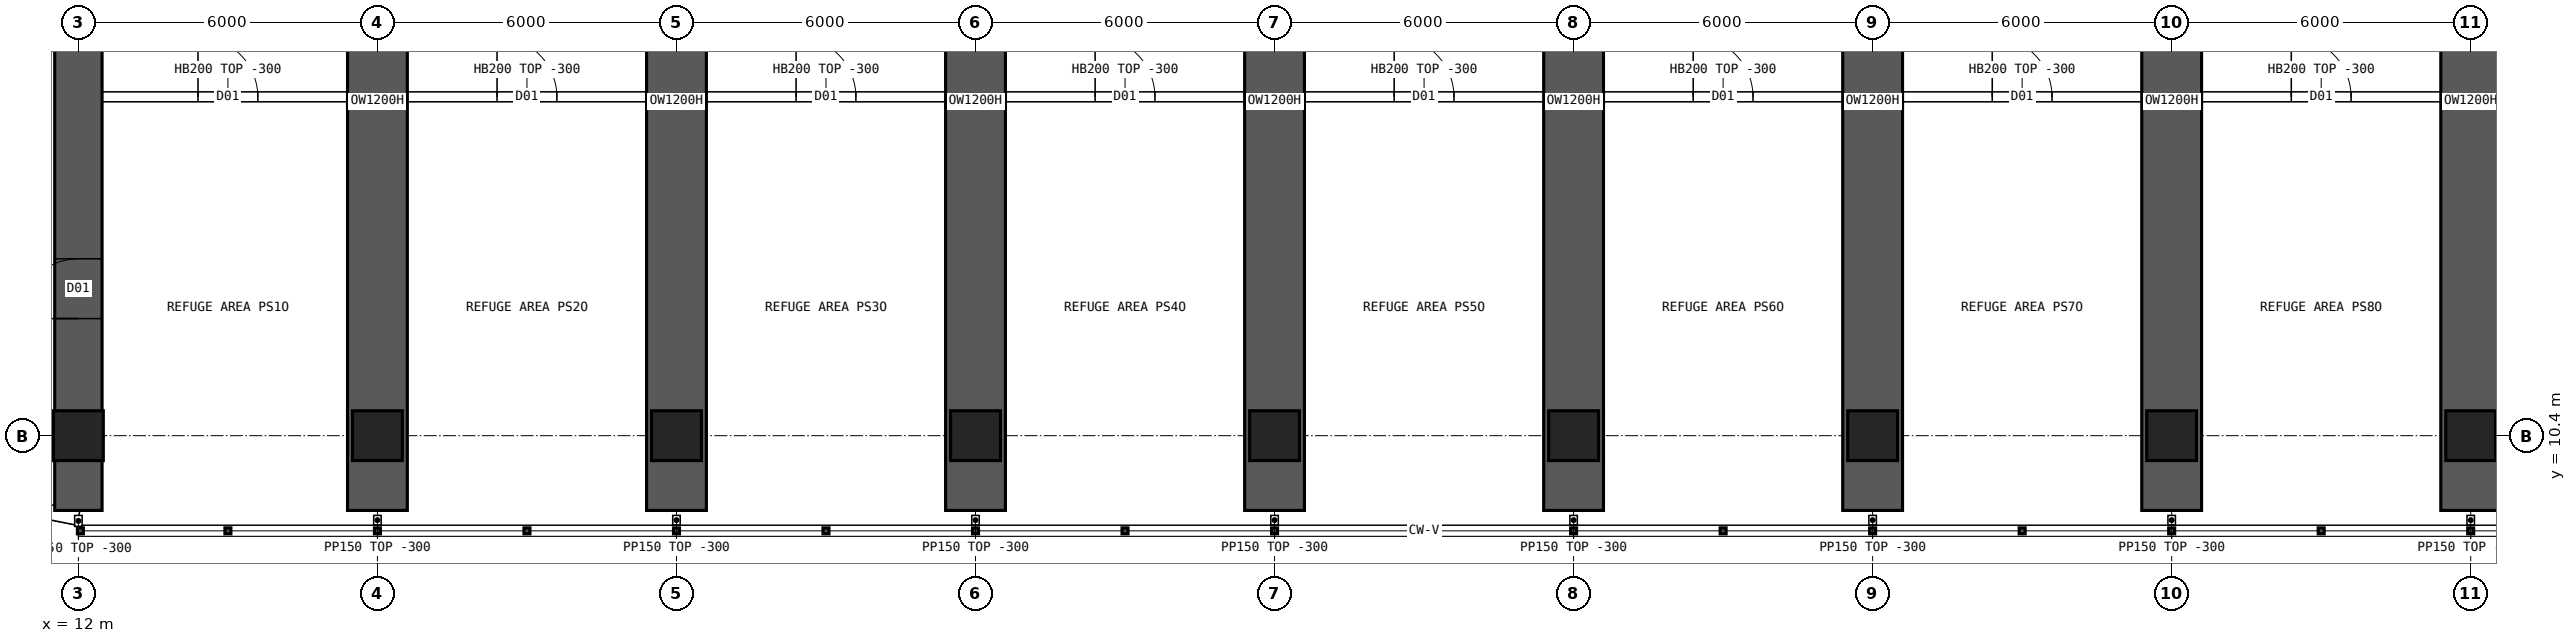
"""IFC4 building model, lengths in metres.
Left out: names, types, materials, properties, quantities, classifications, styles, units other than length and angle.
Written with IfcOpenShell. Run it as: python <this file> out.ifc"""

import sys

from ifc_helpers import new_model, si_unit, direction, frame, frame_2d, origin, origin_2d, place, context, subcontext, project, spatial, polyline, rectangle, hollow_rectangle, outline, extrude, element, fill, save


model = new_model("IFC4")
c1 = context("Model", 3, precision=1e-05, world=origin(), true_north=direction((0.0, 1.0)))
c2 = subcontext(c1, "Body", "Model", "MODEL_VIEW")
j1 = project(units=[si_unit("LENGTHUNIT", "METRE"), si_unit("PLANEANGLEUNIT", "RADIAN")], contexts=[c1])
p1 = place(None, origin())
s1 = spatial("IfcSite", under=j1, at=p1, CompositionType="ELEMENT")
p2 = place(p1, origin())
s2 = spatial("IfcBuilding", under=s1, at=p2, CompositionType="ELEMENT")
p3 = place(p2, frame((0.0, 0.0, 133.15)))
s3 = spatial("IfcBuildingStorey", under=s2, at=p3, CompositionType="ELEMENT", Elevation=133.15)
for number, where, z_axis, x_axis in (
    (1, (12.0, 10.4, 0.0), (0.0, 0.0, 1.0), (1.0, 0.0, 0.0)),
    (2, (18.0, 10.4, 0.0), (0.0, 0.0, 1.0), (1.0, 0.0, 0.0)),
    (3, (24.0, 10.4, 0.0), (0.0, 0.0, 1.0), (1.0, 0.0, 0.0)),
    (4, (30.0, 10.4, 0.0), (0.0, 0.0, 1.0), (1.0, 0.0, 0.0)),
    (5, (36.0, 10.4, 0.0), (0.0, 0.0, 1.0), (1.0, 0.0, 0.0)),
    (6, (42.0, 10.4, 0.0), (0.0, 0.0, 1.0), (1.0, 0.0, 0.0)),
    (7, (48.0, 10.4, 0.0), (0.0, 0.0, 1.0), (1.0, 0.0, 0.0)),
    (8, (54.0, 10.4, 0.0), (0.0, 0.0, 1.0), (1.0, 0.0, 0.0)),
    (9, (60.0, 10.4, 0.0), (0.0, 0.0, 1.0), (1.0, 0.0, 0.0)),
):
    element("IfcColumn", number, at=place(p3, frame(where, z_axis=z_axis, x_axis=x_axis)), inside=s3, PredefinedType="COLUMN", context=c2, shape_type="SweptSolid", body=[
        extrude(hollow_rectangle(XDim=1.0, YDim=1.0, WallThickness=0.1, at=origin_2d()), origin(), (0.0, 0.0, 1.0), 7.2),
    ])
p4 = place(p3, frame((12.0, 8.9, 0.0), z_axis=(0.0, 0.0, 1.0), x_axis=(0.0, 1.0, 0.0)))
e10 = element("IfcWall", 10, at=p4, inside=s3, PredefinedType="SHEAR", context=c2, shape_type="SweptSolid", body=[
    extrude(rectangle(XDim=46.2, YDim=0.95, at=frame_2d((23.1, 0.0))), origin(), (0.0, 0.0, 1.0), 7.2),
])
p5 = place(p4, frame((3.85, 0.0, 0.0)))
e11 = element("IfcOpeningElement", 11, at=p5, cuts=e10, PredefinedType="OPENING", context=c2, shape_type="SweptSolid", body=[
    extrude(rectangle(XDim=1.2, YDim=2.1, at=frame_2d((0.6, 1.05))), frame((0.0, 0.485, 0.0), z_axis=(0.0, -1.0, 0.0), x_axis=(1.0, 0.0, 0.0)), (0.0, 0.0, 1.0), 0.97),
])
p6 = place(p4, frame((10.762, 0.0, 0.0)))
e12 = element("IfcOpeningElement", 12, at=p6, cuts=e10, PredefinedType="OPENING", context=c2, shape_type="SweptSolid", body=[
    extrude(rectangle(XDim=1.2, YDim=2.1, at=frame_2d((0.6, 1.05))), frame((0.0, 0.485, 0.0), z_axis=(0.0, -1.0, 0.0), x_axis=(1.0, 0.0, 0.0)), (0.0, 0.0, 1.0), 0.97),
])
p7 = place(p4, frame((41.15, 0.0, 0.0)))
e13 = element("IfcOpeningElement", 13, at=p7, cuts=e10, PredefinedType="OPENING", context=c2, shape_type="SweptSolid", body=[
    extrude(rectangle(XDim=1.2, YDim=2.1, at=frame_2d((0.6, 1.05))), frame((0.0, 0.485, 0.0), z_axis=(0.0, -1.0, 0.0), x_axis=(1.0, 0.0, 0.0)), (0.0, 0.0, 1.0), 0.97),
])
p8 = place(p4, frame((34.238, 0.0, 0.0)))
e14 = element("IfcOpeningElement", 14, at=p8, cuts=e10, PredefinedType="OPENING", context=c2, shape_type="SweptSolid", body=[
    extrude(rectangle(XDim=1.2, YDim=2.1, at=frame_2d((0.6, 1.05))), frame((0.0, 0.485, 0.0), z_axis=(0.0, -1.0, 0.0), x_axis=(1.0, 0.0, 0.0)), (0.0, 0.0, 1.0), 0.97),
])
p9 = place(p3, frame((18.0, 8.9, 0.0), z_axis=(0.0, 0.0, 1.0), x_axis=(0.0, 1.0, 0.0)))
e15 = element("IfcWall", 15, at=p9, inside=s3, PredefinedType="SHEAR", context=c2, shape_type="SweptSolid", body=[
    extrude(rectangle(XDim=16.425, YDim=1.2, at=frame_2d((8.212, 0.0))), origin(), (0.0, 0.0, 1.0), 7.2),
])
p10 = place(p9, frame((14.825, 0.0, 0.0)))
e16 = element("IfcOpeningElement", 16, at=p10, cuts=e15, PredefinedType="OPENING", context=c2, shape_type="SweptSolid", body=[
    extrude(rectangle(XDim=1.2, YDim=2.1, at=frame_2d((0.6, 1.05))), frame((0.0, 0.61, 0.0), z_axis=(0.0, -1.0, 0.0), x_axis=(1.0, 0.0, 0.0)), (0.0, 0.0, 1.0), 1.22),
])
p11 = place(p3, frame((24.0, 8.9, 0.0), z_axis=(0.0, 0.0, 1.0), x_axis=(0.0, 1.0, 0.0)))
e17 = element("IfcWall", 17, at=p11, inside=s3, PredefinedType="SHEAR", context=c2, shape_type="SweptSolid", body=[
    extrude(rectangle(XDim=16.425, YDim=1.2, at=frame_2d((8.212, 0.0))), origin(), (0.0, 0.0, 1.0), 7.2),
])
p12 = place(p11, frame((14.825, 0.0, 0.0)))
e18 = element("IfcOpeningElement", 18, at=p12, cuts=e17, PredefinedType="OPENING", context=c2, shape_type="SweptSolid", body=[
    extrude(rectangle(XDim=1.2, YDim=2.1, at=frame_2d((0.6, 1.05))), frame((0.0, 0.61, 0.0), z_axis=(0.0, -1.0, 0.0), x_axis=(1.0, 0.0, 0.0)), (0.0, 0.0, 1.0), 1.22),
])
p13 = place(p3, frame((30.0, 8.9, 0.0), z_axis=(0.0, 0.0, 1.0), x_axis=(0.0, 1.0, 0.0)))
e19 = element("IfcWall", 19, at=p13, inside=s3, PredefinedType="SHEAR", context=c2, shape_type="SweptSolid", body=[
    extrude(rectangle(XDim=16.425, YDim=1.2, at=frame_2d((8.212, 0.0))), origin(), (0.0, 0.0, 1.0), 7.2),
])
p14 = place(p13, frame((14.825, 0.0, 0.0)))
e20 = element("IfcOpeningElement", 20, at=p14, cuts=e19, PredefinedType="OPENING", context=c2, shape_type="SweptSolid", body=[
    extrude(rectangle(XDim=1.2, YDim=2.1, at=frame_2d((0.6, 1.05))), frame((0.0, 0.61, 0.0), z_axis=(0.0, -1.0, 0.0), x_axis=(1.0, 0.0, 0.0)), (0.0, 0.0, 1.0), 1.22),
])
p15 = place(p3, frame((36.0, 8.9, 0.0), z_axis=(0.0, 0.0, 1.0), x_axis=(0.0, 1.0, 0.0)))
e21 = element("IfcWall", 21, at=p15, inside=s3, PredefinedType="SHEAR", context=c2, shape_type="SweptSolid", body=[
    extrude(rectangle(XDim=16.425, YDim=1.2, at=frame_2d((8.212, 0.0))), origin(), (0.0, 0.0, 1.0), 7.2),
])
p16 = place(p15, frame((14.825, 0.0, 0.0)))
e22 = element("IfcOpeningElement", 22, at=p16, cuts=e21, PredefinedType="OPENING", context=c2, shape_type="SweptSolid", body=[
    extrude(rectangle(XDim=1.2, YDim=2.1, at=frame_2d((0.6, 1.05))), frame((0.0, 0.61, 0.0), z_axis=(0.0, -1.0, 0.0), x_axis=(1.0, 0.0, 0.0)), (0.0, 0.0, 1.0), 1.22),
])
p17 = place(p3, frame((42.0, 8.9, 0.0), z_axis=(0.0, 0.0, 1.0), x_axis=(0.0, 1.0, 0.0)))
e23 = element("IfcWall", 23, at=p17, inside=s3, PredefinedType="SHEAR", context=c2, shape_type="SweptSolid", body=[
    extrude(rectangle(XDim=16.425, YDim=1.2, at=frame_2d((8.212, 0.0))), origin(), (0.0, 0.0, 1.0), 7.2),
])
p18 = place(p17, frame((14.825, 0.0, 0.0)))
e24 = element("IfcOpeningElement", 24, at=p18, cuts=e23, PredefinedType="OPENING", context=c2, shape_type="SweptSolid", body=[
    extrude(rectangle(XDim=1.2, YDim=2.1, at=frame_2d((0.6, 1.05))), frame((0.0, 0.61, 0.0), z_axis=(0.0, -1.0, 0.0), x_axis=(1.0, 0.0, 0.0)), (0.0, 0.0, 1.0), 1.22),
])
p19 = place(p3, frame((48.0, 8.9, 0.0), z_axis=(0.0, 0.0, 1.0), x_axis=(0.0, 1.0, 0.0)))
e25 = element("IfcWall", 25, at=p19, inside=s3, PredefinedType="SHEAR", context=c2, shape_type="SweptSolid", body=[
    extrude(rectangle(XDim=16.425, YDim=1.2, at=frame_2d((8.212, 0.0))), origin(), (0.0, 0.0, 1.0), 7.2),
])
p20 = place(p19, frame((14.825, 0.0, 0.0)))
e26 = element("IfcOpeningElement", 26, at=p20, cuts=e25, PredefinedType="OPENING", context=c2, shape_type="SweptSolid", body=[
    extrude(rectangle(XDim=1.2, YDim=2.1, at=frame_2d((0.6, 1.05))), frame((0.0, 0.61, 0.0), z_axis=(0.0, -1.0, 0.0), x_axis=(1.0, 0.0, 0.0)), (0.0, 0.0, 1.0), 1.22),
])
p21 = place(p3, frame((54.0, 8.9, 0.0), z_axis=(0.0, 0.0, 1.0), x_axis=(0.0, 1.0, 0.0)))
e27 = element("IfcWall", 27, at=p21, inside=s3, PredefinedType="SHEAR", context=c2, shape_type="SweptSolid", body=[
    extrude(rectangle(XDim=16.425, YDim=1.2, at=frame_2d((8.212, 0.0))), origin(), (0.0, 0.0, 1.0), 7.2),
])
p22 = place(p21, frame((14.825, 0.0, 0.0)))
e28 = element("IfcOpeningElement", 28, at=p22, cuts=e27, PredefinedType="OPENING", context=c2, shape_type="SweptSolid", body=[
    extrude(rectangle(XDim=1.2, YDim=2.1, at=frame_2d((0.6, 1.05))), frame((0.0, 0.61, 0.0), z_axis=(0.0, -1.0, 0.0), x_axis=(1.0, 0.0, 0.0)), (0.0, 0.0, 1.0), 1.22),
])
p23 = place(p3, frame((60.0, 8.9, 0.0), z_axis=(0.0, 0.0, 1.0), x_axis=(0.0, 1.0, 0.0)))
e29 = element("IfcWall", 29, at=p23, inside=s3, PredefinedType="SHEAR", context=c2, shape_type="SweptSolid", body=[
    extrude(rectangle(XDim=16.425, YDim=1.2, at=frame_2d((8.212, 0.0))), origin(), (0.0, 0.0, 1.0), 7.2),
])
p24 = place(p23, frame((14.825, 0.0, 0.0)))
e30 = element("IfcOpeningElement", 30, at=p24, cuts=e29, PredefinedType="OPENING", context=c2, shape_type="SweptSolid", body=[
    extrude(rectangle(XDim=1.2, YDim=2.1, at=frame_2d((0.6, 1.05))), frame((0.0, 0.61, 0.0), z_axis=(0.0, -1.0, 0.0), x_axis=(1.0, 0.0, 0.0)), (0.0, 0.0, 1.0), 1.22),
])
p25 = place(p3, frame((8.843, 9.378, 0.0), z_axis=(0.0, 0.0, 1.0), x_axis=(0.980787251524, -0.195080412259, 0.0)))
e31 = element("IfcWall", 31, at=p25, inside=s3, PredefinedType="SOLIDWALL", context=c2, shape_type="SweptSolid", body=[
    extrude(outline(polyline([(-0.03, -0.15), (3.249, -0.15), (3.189, 0.15), (0.03, 0.15), (-0.03, -0.15)])), origin(), (0.0, 0.0, 1.0), 6.9),
])
p26 = place(p3, frame((12.475, 17.2, 0.0), z_axis=(0.0, 0.0, 1.0), x_axis=(1.0, 0.0, 0.0)))
e32 = element("IfcWall", 32, at=p26, inside=s3, PredefinedType="SOLIDWALL", context=c2, shape_type="SweptSolid", body=[
    extrude(rectangle(XDim=5.05, YDim=0.2, at=frame_2d((2.525, 0.0))), origin(), (0.0, 0.0, 1.0), 6.9),
])
p27 = place(p26, frame((1.925, 0.0, 0.0)))
e33 = element("IfcOpeningElement", 33, at=p27, cuts=e32, PredefinedType="OPENING", context=c2, shape_type="SweptSolid", body=[
    extrude(rectangle(XDim=1.2, YDim=2.1, at=frame_2d((0.6, 1.05))), frame((0.0, 0.11, 0.0), z_axis=(0.0, -1.0, 0.0), x_axis=(1.0, 0.0, 0.0)), (0.0, 0.0, 1.0), 0.22),
])
p28 = place(p3, frame((18.475, 17.2, 0.0), z_axis=(0.0, 0.0, 1.0), x_axis=(1.0, 0.0, 0.0)))
e34 = element("IfcWall", 34, at=p28, inside=s3, PredefinedType="SOLIDWALL", context=c2, shape_type="SweptSolid", body=[
    extrude(rectangle(XDim=5.05, YDim=0.2, at=frame_2d((2.525, 0.0))), origin(), (0.0, 0.0, 1.0), 6.9),
])
p29 = place(p28, frame((1.925, 0.0, 0.0)))
e35 = element("IfcOpeningElement", 35, at=p29, cuts=e34, PredefinedType="OPENING", context=c2, shape_type="SweptSolid", body=[
    extrude(rectangle(XDim=1.2, YDim=2.1, at=frame_2d((0.6, 1.05))), frame((0.0, 0.11, 0.0), z_axis=(0.0, -1.0, 0.0), x_axis=(1.0, 0.0, 0.0)), (0.0, 0.0, 1.0), 0.22),
])
p30 = place(p3, frame((24.475, 17.2, 0.0), z_axis=(0.0, 0.0, 1.0), x_axis=(1.0, 0.0, 0.0)))
e36 = element("IfcWall", 36, at=p30, inside=s3, PredefinedType="SOLIDWALL", context=c2, shape_type="SweptSolid", body=[
    extrude(rectangle(XDim=5.05, YDim=0.2, at=frame_2d((2.525, 0.0))), origin(), (0.0, 0.0, 1.0), 6.9),
])
p31 = place(p30, frame((1.925, 0.0, 0.0)))
e37 = element("IfcOpeningElement", 37, at=p31, cuts=e36, PredefinedType="OPENING", context=c2, shape_type="SweptSolid", body=[
    extrude(rectangle(XDim=1.2, YDim=2.1, at=frame_2d((0.6, 1.05))), frame((0.0, 0.11, 0.0), z_axis=(0.0, -1.0, 0.0), x_axis=(1.0, 0.0, 0.0)), (0.0, 0.0, 1.0), 0.22),
])
p32 = place(p3, frame((30.475, 17.2, 0.0), z_axis=(0.0, 0.0, 1.0), x_axis=(1.0, 0.0, 0.0)))
e38 = element("IfcWall", 38, at=p32, inside=s3, PredefinedType="SOLIDWALL", context=c2, shape_type="SweptSolid", body=[
    extrude(rectangle(XDim=5.05, YDim=0.2, at=frame_2d((2.525, 0.0))), origin(), (0.0, 0.0, 1.0), 6.9),
])
p33 = place(p32, frame((1.925, 0.0, 0.0)))
e39 = element("IfcOpeningElement", 39, at=p33, cuts=e38, PredefinedType="OPENING", context=c2, shape_type="SweptSolid", body=[
    extrude(rectangle(XDim=1.2, YDim=2.1, at=frame_2d((0.6, 1.05))), frame((0.0, 0.11, 0.0), z_axis=(0.0, -1.0, 0.0), x_axis=(1.0, 0.0, 0.0)), (0.0, 0.0, 1.0), 0.22),
])
p34 = place(p3, frame((36.475, 17.2, 0.0), z_axis=(0.0, 0.0, 1.0), x_axis=(1.0, 0.0, 0.0)))
e40 = element("IfcWall", 40, at=p34, inside=s3, PredefinedType="SOLIDWALL", context=c2, shape_type="SweptSolid", body=[
    extrude(rectangle(XDim=5.05, YDim=0.2, at=frame_2d((2.525, 0.0))), origin(), (0.0, 0.0, 1.0), 6.9),
])
p35 = place(p34, frame((1.925, 0.0, 0.0)))
e41 = element("IfcOpeningElement", 41, at=p35, cuts=e40, PredefinedType="OPENING", context=c2, shape_type="SweptSolid", body=[
    extrude(rectangle(XDim=1.2, YDim=2.1, at=frame_2d((0.6, 1.05))), frame((0.0, 0.11, 0.0), z_axis=(0.0, -1.0, 0.0), x_axis=(1.0, 0.0, 0.0)), (0.0, 0.0, 1.0), 0.22),
])
p36 = place(p3, frame((42.475, 17.2, 0.0), z_axis=(0.0, 0.0, 1.0), x_axis=(1.0, 0.0, 0.0)))
e42 = element("IfcWall", 42, at=p36, inside=s3, PredefinedType="SOLIDWALL", context=c2, shape_type="SweptSolid", body=[
    extrude(rectangle(XDim=5.05, YDim=0.2, at=frame_2d((2.525, 0.0))), origin(), (0.0, 0.0, 1.0), 6.9),
])
p37 = place(p36, frame((1.925, 0.0, 0.0)))
e43 = element("IfcOpeningElement", 43, at=p37, cuts=e42, PredefinedType="OPENING", context=c2, shape_type="SweptSolid", body=[
    extrude(rectangle(XDim=1.2, YDim=2.1, at=frame_2d((0.6, 1.05))), frame((0.0, 0.11, 0.0), z_axis=(0.0, -1.0, 0.0), x_axis=(1.0, 0.0, 0.0)), (0.0, 0.0, 1.0), 0.22),
])
p38 = place(p3, frame((48.475, 17.2, 0.0), z_axis=(0.0, 0.0, 1.0), x_axis=(1.0, 0.0, 0.0)))
e44 = element("IfcWall", 44, at=p38, inside=s3, PredefinedType="SOLIDWALL", context=c2, shape_type="SweptSolid", body=[
    extrude(rectangle(XDim=5.05, YDim=0.2, at=frame_2d((2.525, 0.0))), origin(), (0.0, 0.0, 1.0), 6.9),
])
p39 = place(p38, frame((1.925, 0.0, 0.0)))
e45 = element("IfcOpeningElement", 45, at=p39, cuts=e44, PredefinedType="OPENING", context=c2, shape_type="SweptSolid", body=[
    extrude(rectangle(XDim=1.2, YDim=2.1, at=frame_2d((0.6, 1.05))), frame((0.0, 0.11, 0.0), z_axis=(0.0, -1.0, 0.0), x_axis=(1.0, 0.0, 0.0)), (0.0, 0.0, 1.0), 0.22),
])
p40 = place(p3, frame((54.475, 17.2, 0.0), z_axis=(0.0, 0.0, 1.0), x_axis=(1.0, 0.0, 0.0)))
e46 = element("IfcWall", 46, at=p40, inside=s3, PredefinedType="SOLIDWALL", context=c2, shape_type="SweptSolid", body=[
    extrude(rectangle(XDim=5.05, YDim=0.2, at=frame_2d((2.525, 0.0))), origin(), (0.0, 0.0, 1.0), 6.9),
])
p41 = place(p40, frame((1.925, 0.0, 0.0)))
e47 = element("IfcOpeningElement", 47, at=p41, cuts=e46, PredefinedType="OPENING", context=c2, shape_type="SweptSolid", body=[
    extrude(rectangle(XDim=1.2, YDim=2.1, at=frame_2d((0.6, 1.05))), frame((0.0, 0.11, 0.0), z_axis=(0.0, -1.0, 0.0), x_axis=(1.0, 0.0, 0.0)), (0.0, 0.0, 1.0), 0.22),
])
p42 = place(p3, frame((60.475, 17.2, 0.0), z_axis=(0.0, 0.0, 1.0), x_axis=(1.0, 0.0, 0.0)))
e48 = element("IfcWall", 48, at=p42, inside=s3, PredefinedType="SOLIDWALL", context=c2, shape_type="SweptSolid", body=[
    extrude(rectangle(XDim=5.05, YDim=0.2, at=frame_2d((2.525, 0.0))), origin(), (0.0, 0.0, 1.0), 6.9),
])
p43 = place(p42, frame((1.925, 0.0, 0.0)))
e49 = element("IfcOpeningElement", 49, at=p43, cuts=e48, PredefinedType="OPENING", context=c2, shape_type="SweptSolid", body=[
    extrude(rectangle(XDim=1.2, YDim=2.1, at=frame_2d((0.6, 1.05))), frame((0.0, 0.11, 0.0), z_axis=(0.0, -1.0, 0.0), x_axis=(1.0, 0.0, 0.0)), (0.0, 0.0, 1.0), 0.22),
])
p44 = place(p3, frame((12.0, 8.8, 0.0), z_axis=(0.0, 0.0, 1.0), x_axis=(0.0, -1.0, 0.0)))
e50 = element("IfcWall", 50, at=p44, inside=s3, PredefinedType="PARTITIONING", context=c2, shape_type="SweptSolid", body=[
    extrude(rectangle(XDim=0.22, YDim=0.15, at=frame_2d((0.11, 0.0))), origin(), (0.0, 0.0, 1.0), 6.9),
])
for number, where, z_axis, x_axis in (
    (51, (18.0, 8.8, 0.0), (0.0, 0.0, 1.0), (0.0, -1.0, 0.0)),
    (52, (24.0, 8.8, 0.0), (0.0, 0.0, 1.0), (0.0, -1.0, 0.0)),
    (53, (30.0, 8.8, 0.0), (0.0, 0.0, 1.0), (0.0, -1.0, 0.0)),
    (54, (36.0, 8.8, 0.0), (0.0, 0.0, 1.0), (0.0, -1.0, 0.0)),
    (55, (42.0, 8.8, 0.0), (0.0, 0.0, 1.0), (0.0, -1.0, 0.0)),
    (56, (48.0, 8.8, 0.0), (0.0, 0.0, 1.0), (0.0, -1.0, 0.0)),
    (57, (54.0, 8.8, 0.0), (0.0, 0.0, 1.0), (0.0, -1.0, 0.0)),
    (58, (60.0, 8.8, 0.0), (0.0, 0.0, 1.0), (0.0, -1.0, 0.0)),
):
    element("IfcWall", number, at=place(p3, frame(where, z_axis=z_axis, x_axis=x_axis)), inside=s3, PredefinedType="PARTITIONING", context=c2, shape_type="SweptSolid", body=[
        extrude(rectangle(XDim=0.19, YDim=0.15, at=frame_2d((0.095, 0.0))), origin(), (0.0, 0.0, 1.0), 6.9),
    ])
p45 = place(p27, origin())
e59 = element("IfcDoor", 59, at=p45, inside=s3, OperationType="SINGLE_SWING_LEFT", PredefinedType="DOOR", context=c2, shape_type="SweptSolid", body=[
    extrude(rectangle(XDim=1.2, YDim=2.1, at=frame_2d((0.6, 1.05))), frame((0.0, 0.025, 0.0), z_axis=(0.0, -1.0, 0.0), x_axis=(1.0, 0.0, 0.0)), (0.0, 0.0, 1.0), 0.05),
])
fill(e33, e59)
p46 = place(p29, origin())
e60 = element("IfcDoor", 60, at=p46, inside=s3, OperationType="SINGLE_SWING_LEFT", PredefinedType="DOOR", context=c2, shape_type="SweptSolid", body=[
    extrude(rectangle(XDim=1.2, YDim=2.1, at=frame_2d((0.6, 1.05))), frame((0.0, 0.025, 0.0), z_axis=(0.0, -1.0, 0.0), x_axis=(1.0, 0.0, 0.0)), (0.0, 0.0, 1.0), 0.05),
])
fill(e35, e60)
p47 = place(p31, origin())
e61 = element("IfcDoor", 61, at=p47, inside=s3, OperationType="SINGLE_SWING_LEFT", PredefinedType="DOOR", context=c2, shape_type="SweptSolid", body=[
    extrude(rectangle(XDim=1.2, YDim=2.1, at=frame_2d((0.6, 1.05))), frame((0.0, 0.025, 0.0), z_axis=(0.0, -1.0, 0.0), x_axis=(1.0, 0.0, 0.0)), (0.0, 0.0, 1.0), 0.05),
])
fill(e37, e61)
p48 = place(p33, origin())
e62 = element("IfcDoor", 62, at=p48, inside=s3, OperationType="SINGLE_SWING_LEFT", PredefinedType="DOOR", context=c2, shape_type="SweptSolid", body=[
    extrude(rectangle(XDim=1.2, YDim=2.1, at=frame_2d((0.6, 1.05))), frame((0.0, 0.025, 0.0), z_axis=(0.0, -1.0, 0.0), x_axis=(1.0, 0.0, 0.0)), (0.0, 0.0, 1.0), 0.05),
])
fill(e39, e62)
p49 = place(p35, origin())
e63 = element("IfcDoor", 63, at=p49, inside=s3, OperationType="SINGLE_SWING_LEFT", PredefinedType="DOOR", context=c2, shape_type="SweptSolid", body=[
    extrude(rectangle(XDim=1.2, YDim=2.1, at=frame_2d((0.6, 1.05))), frame((0.0, 0.025, 0.0), z_axis=(0.0, -1.0, 0.0), x_axis=(1.0, 0.0, 0.0)), (0.0, 0.0, 1.0), 0.05),
])
fill(e41, e63)
p50 = place(p37, origin())
e64 = element("IfcDoor", 64, at=p50, inside=s3, OperationType="SINGLE_SWING_LEFT", PredefinedType="DOOR", context=c2, shape_type="SweptSolid", body=[
    extrude(rectangle(XDim=1.2, YDim=2.1, at=frame_2d((0.6, 1.05))), frame((0.0, 0.025, 0.0), z_axis=(0.0, -1.0, 0.0), x_axis=(1.0, 0.0, 0.0)), (0.0, 0.0, 1.0), 0.05),
])
fill(e43, e64)
p51 = place(p39, origin())
e65 = element("IfcDoor", 65, at=p51, inside=s3, OperationType="SINGLE_SWING_LEFT", PredefinedType="DOOR", context=c2, shape_type="SweptSolid", body=[
    extrude(rectangle(XDim=1.2, YDim=2.1, at=frame_2d((0.6, 1.05))), frame((0.0, 0.025, 0.0), z_axis=(0.0, -1.0, 0.0), x_axis=(1.0, 0.0, 0.0)), (0.0, 0.0, 1.0), 0.05),
])
fill(e45, e65)
p52 = place(p41, origin())
e66 = element("IfcDoor", 66, at=p52, inside=s3, OperationType="SINGLE_SWING_LEFT", PredefinedType="DOOR", context=c2, shape_type="SweptSolid", body=[
    extrude(rectangle(XDim=1.2, YDim=2.1, at=frame_2d((0.6, 1.05))), frame((0.0, 0.025, 0.0), z_axis=(0.0, -1.0, 0.0), x_axis=(1.0, 0.0, 0.0)), (0.0, 0.0, 1.0), 0.05),
])
fill(e47, e66)
p53 = place(p5, origin())
e67 = element("IfcDoor", 67, at=p53, inside=s3, OperationType="SINGLE_SWING_LEFT", PredefinedType="DOOR", context=c2, shape_type="SweptSolid", body=[
    extrude(rectangle(XDim=1.2, YDim=2.1, at=frame_2d((0.6, 1.05))), frame((0.0, 0.46, 0.0), z_axis=(0.0, -1.0, 0.0), x_axis=(1.0, 0.0, 0.0)), (0.0, 0.0, 1.0), 0.05),
])
fill(e11, e67)
save(model, sys.argv[1])
